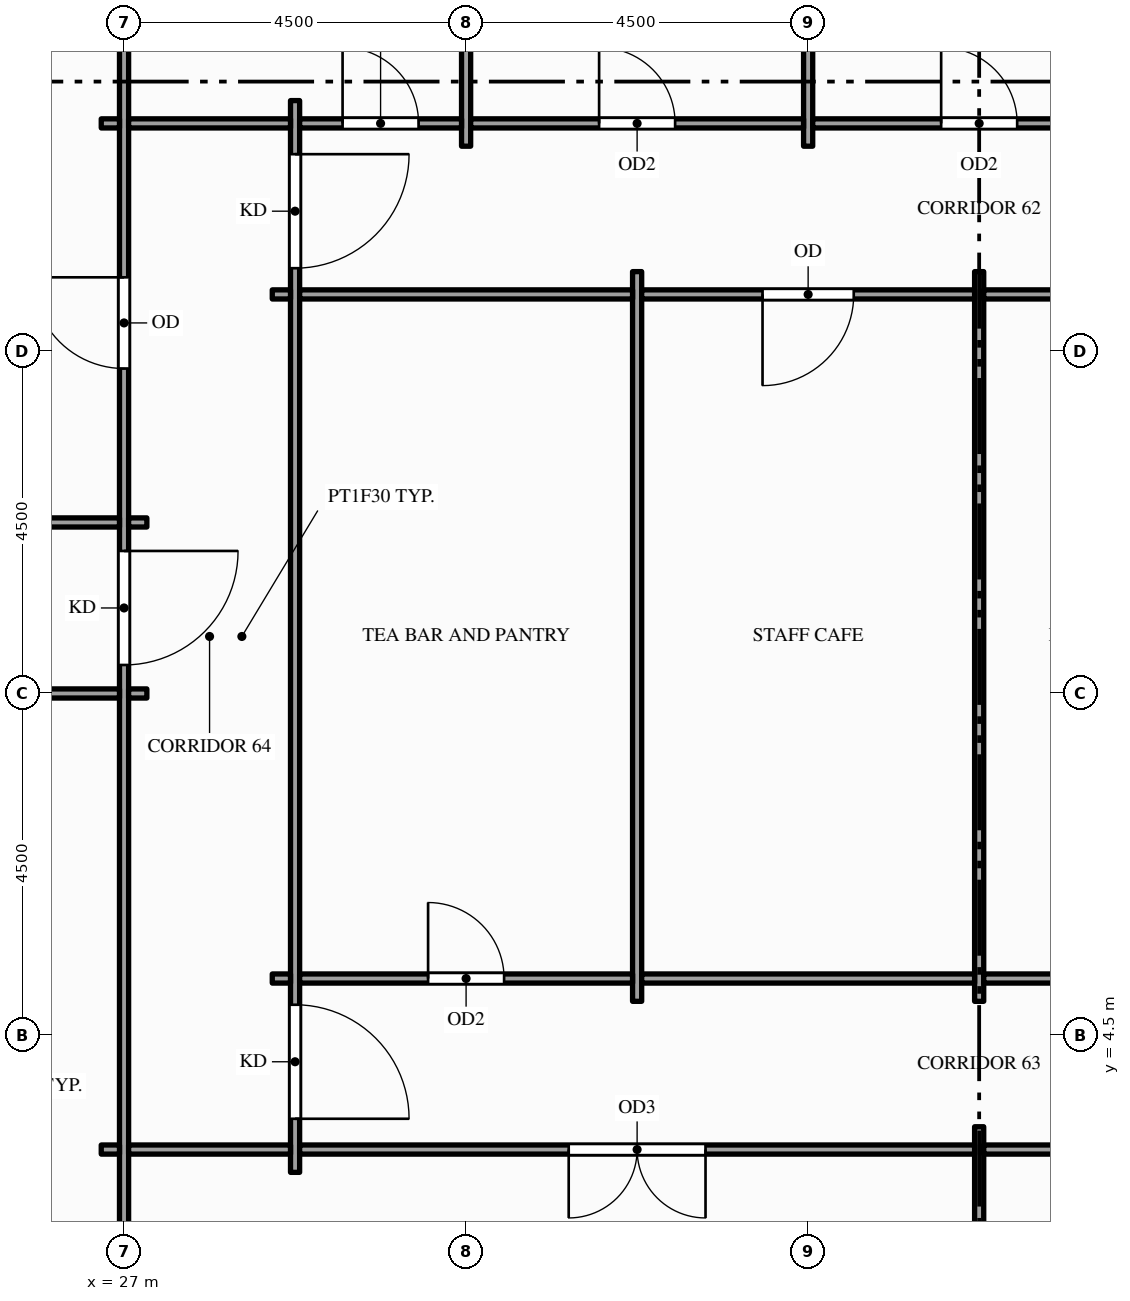
"""IFC4 building model, lengths in metres.
Left out: names, types, materials, properties, quantities, classifications, styles, units other than length and angle.
Written with IfcOpenShell. Run it as: python <this file> out.ifc"""

import sys

from ifc_helpers import new_model, si_unit, direction, frame, frame_2d, origin, place, context, subcontext, project, spatial, rectangle, extrude, element, fill, save


model = new_model("IFC4")
c1 = context("Model", 3, precision=1e-05, world=origin(), true_north=direction((0.0, 1.0)))
c2 = subcontext(c1, "Body", "Model", "MODEL_VIEW")
j1 = project(units=[si_unit("LENGTHUNIT", "METRE"), si_unit("PLANEANGLEUNIT", "RADIAN")], contexts=[c1])
p1 = place(None, origin())
s1 = spatial("IfcSite", under=j1, at=p1, CompositionType="ELEMENT")
p2 = place(p1, origin())
s2 = spatial("IfcBuilding", under=s1, at=p2, CompositionType="ELEMENT")
p3 = place(p2, frame((0.0, 0.0, 227.0)))
s3 = spatial("IfcBuildingStorey", under=s2, at=p3, CompositionType="ELEMENT", Elevation=227.0)
p4 = place(p3, frame((27.0, -1.35, 0.0), z_axis=(0.0, 0.0, 1.0), x_axis=(0.0, 1.0, 0.0)))
e1 = element("IfcWall", 1, at=p4, inside=s3, PredefinedType="PARTITIONING", context=c2, shape_type="SweptSolid", body=[
    extrude(rectangle(XDim=22.48, YDim=0.12, at=frame_2d((11.24, 0.0))), origin(), (0.0, 0.0, 1.0), 2.87),
])
p5 = place(p4, frame((10.725, 0.0, 0.0)))
e2 = element("IfcOpeningElement", 2, at=p5, cuts=e1, PredefinedType="OPENING", context=c2, shape_type="SweptSolid", body=[
    extrude(rectangle(XDim=1.5, YDim=2.1, at=frame_2d((0.75, 1.05))), frame((0.0, 0.07, 0.0), z_axis=(0.0, -1.0, 0.0), x_axis=(1.0, 0.0, 0.0)), (0.0, 0.0, 1.0), 0.14),
])
p6 = place(p4, frame((14.625, 0.0, 0.0)))
e3 = element("IfcOpeningElement", 3, at=p6, cuts=e1, PredefinedType="OPENING", context=c2, shape_type="SweptSolid", body=[
    extrude(rectangle(XDim=1.2, YDim=2.1, at=frame_2d((0.6, 1.05))), frame((0.0, 0.07, 0.0), z_axis=(0.0, -1.0, 0.0), x_axis=(1.0, 0.0, 0.0)), (0.0, 0.0, 1.0), 0.14),
])
p7 = place(p3, frame((29.25, 2.7, 0.0), z_axis=(0.0, 0.0, 1.0), x_axis=(0.0, 1.0, 0.0)))
e4 = element("IfcWall", 4, at=p7, inside=s3, PredefinedType="PARTITIONING", context=c2, shape_type="SweptSolid", body=[
    extrude(rectangle(XDim=14.1, YDim=0.12, at=frame_2d((7.05, 0.0))), origin(), (0.0, 0.0, 1.0), 2.87),
])
p8 = place(p7, frame((0.705, 0.0, 0.0)))
e5 = element("IfcOpeningElement", 5, at=p8, cuts=e4, PredefinedType="OPENING", context=c2, shape_type="SweptSolid", body=[
    extrude(rectangle(XDim=1.5, YDim=2.1, at=frame_2d((0.75, 1.05))), frame((0.0, 0.07, 0.0), z_axis=(0.0, -1.0, 0.0), x_axis=(1.0, 0.0, 0.0)), (0.0, 0.0, 1.0), 0.14),
])
p9 = place(p7, frame((11.895, 0.0, 0.0)))
e6 = element("IfcOpeningElement", 6, at=p9, cuts=e4, PredefinedType="OPENING", context=c2, shape_type="SweptSolid", body=[
    extrude(rectangle(XDim=1.5, YDim=2.1, at=frame_2d((0.75, 1.05))), frame((0.0, 0.07, 0.0), z_axis=(0.0, -1.0, 0.0), x_axis=(1.0, 0.0, 0.0)), (0.0, 0.0, 1.0), 0.14),
])
p10 = place(p3, frame((31.5, 16.2, 0.0), z_axis=(0.0, 0.0, 1.0), x_axis=(0.0, 1.0, 0.0)))
e7 = element("IfcWall", 7, at=p10, inside=s3, PredefinedType="PARTITIONING", context=c2, shape_type="SweptSolid", body=[
    extrude(rectangle(XDim=4.65, YDim=0.12, at=frame_2d((2.325, 0.0))), origin(), (0.0, 0.0, 1.0), 2.87),
])
p11 = place(p3, frame((33.75, 4.95, 0.0), z_axis=(0.0, 0.0, 1.0), x_axis=(0.0, 1.0, 0.0)))
e8 = element("IfcWall", 8, at=p11, inside=s3, PredefinedType="PARTITIONING", context=c2, shape_type="SweptSolid", body=[
    extrude(rectangle(XDim=9.6, YDim=0.12, at=frame_2d((4.8, 0.0))), origin(), (0.0, 0.0, 1.0), 2.87),
])
for number, where, z_axis, x_axis in (
    (9, (36.0, 16.2, 0.0), (0.0, 0.0, 1.0), (0.0, 1.0, 0.0)),
    (10, (38.25, -1.35, 0.0), (0.0, 0.0, 1.0), (0.0, 1.0, 0.0)),
):
    element("IfcWall", number, at=place(p3, frame(where, z_axis=z_axis, x_axis=x_axis)), inside=s3, PredefinedType="PARTITIONING", context=c2, shape_type="SweptSolid", body=[
        extrude(rectangle(XDim=4.65, YDim=0.12, at=frame_2d((2.325, 0.0))), origin(), (0.0, 0.0, 1.0), 2.87),
    ])
p12 = place(p3, frame((38.25, 4.95, 0.0), z_axis=(0.0, 0.0, 1.0), x_axis=(0.0, 1.0, 0.0)))
e11 = element("IfcWall", 11, at=p12, inside=s3, PredefinedType="PARTITIONING", context=c2, shape_type="SweptSolid", body=[
    extrude(rectangle(XDim=9.6, YDim=0.12, at=frame_2d((4.8, 0.0))), origin(), (0.0, 0.0, 1.0), 2.87),
])
p13 = place(p3, frame((26.7, 3.0, 0.0), z_axis=(0.0, 0.0, 1.0), x_axis=(1.0, 0.0, 0.0)))
e12 = element("IfcWall", 12, at=p13, inside=s3, PredefinedType="PARTITIONING", context=c2, shape_type="SweptSolid", body=[
    extrude(rectangle(XDim=0.24, YDim=0.12, at=frame_2d((0.12, 0.0))), origin(), (0.0, 0.0, 1.0), 2.87),
])
p14 = place(p3, frame((27.06, 3.0, 0.0), z_axis=(0.0, 0.0, 1.0), x_axis=(1.0, 0.0, 0.0)))
e13 = element("IfcWall", 13, at=p14, inside=s3, PredefinedType="PARTITIONING", context=c2, shape_type="SweptSolid", body=[
    extrude(rectangle(XDim=2.13, YDim=0.12, at=frame_2d((1.065, 0.0))), origin(), (0.0, 0.0, 1.0), 2.87),
])
p15 = place(p3, frame((29.31, 3.0, 0.0), z_axis=(0.0, 0.0, 1.0), x_axis=(1.0, 0.0, 0.0)))
e14 = element("IfcWall", 14, at=p15, inside=s3, PredefinedType="PARTITIONING", context=c2, shape_type="SweptSolid", body=[
    extrude(rectangle(XDim=8.88, YDim=0.12, at=frame_2d((4.44, 0.0))), origin(), (0.0, 0.0, 1.0), 2.87),
])
p16 = place(p15, frame((3.54, 0.0, 0.0)))
e15 = element("IfcOpeningElement", 15, at=p16, cuts=e14, PredefinedType="OPENING", context=c2, shape_type="SweptSolid", body=[
    extrude(rectangle(XDim=1.8, YDim=2.1, at=frame_2d((0.9, 1.05))), frame((0.0, 0.07, 0.0), z_axis=(0.0, -1.0, 0.0), x_axis=(1.0, 0.0, 0.0)), (0.0, 0.0, 1.0), 0.14),
])
p17 = place(p3, frame((38.31, 3.0, 0.0), z_axis=(0.0, 0.0, 1.0), x_axis=(1.0, 0.0, 0.0)))
e16 = element("IfcWall", 16, at=p17, inside=s3, PredefinedType="PARTITIONING", context=c2, shape_type="SweptSolid", body=[
    extrude(rectangle(XDim=4.38, YDim=0.12, at=frame_2d((2.19, 0.0))), origin(), (0.0, 0.0, 1.0), 2.87),
])
p18 = place(p17, frame((1.69, 0.0, 0.0)))
e17 = element("IfcOpeningElement", 17, at=p18, cuts=e16, PredefinedType="OPENING", context=c2, shape_type="SweptSolid", body=[
    extrude(rectangle(XDim=1.0, YDim=2.1, at=frame_2d((0.5, 1.05))), frame((0.0, 0.07, 0.0), z_axis=(0.0, -1.0, 0.0), x_axis=(1.0, 0.0, 0.0)), (0.0, 0.0, 1.0), 0.14),
])
p19 = place(p3, frame((28.95, 5.25, 0.0), z_axis=(0.0, 0.0, 1.0), x_axis=(1.0, 0.0, 0.0)))
e18 = element("IfcWall", 18, at=p19, inside=s3, PredefinedType="PARTITIONING", context=c2, shape_type="SweptSolid", body=[
    extrude(rectangle(XDim=0.24, YDim=0.12, at=frame_2d((0.12, 0.0))), origin(), (0.0, 0.0, 1.0), 2.87),
])
p20 = place(p3, frame((29.31, 5.25, 0.0), z_axis=(0.0, 0.0, 1.0), x_axis=(1.0, 0.0, 0.0)))
e19 = element("IfcWall", 19, at=p20, inside=s3, PredefinedType="PARTITIONING", context=c2, shape_type="SweptSolid", body=[
    extrude(rectangle(XDim=4.38, YDim=0.12, at=frame_2d((2.19, 0.0))), origin(), (0.0, 0.0, 1.0), 2.87),
])
p21 = place(p20, frame((1.69, 0.0, 0.0)))
e20 = element("IfcOpeningElement", 20, at=p21, cuts=e19, PredefinedType="OPENING", context=c2, shape_type="SweptSolid", body=[
    extrude(rectangle(XDim=1.0, YDim=2.1, at=frame_2d((0.5, 1.05))), frame((0.0, 0.07, 0.0), z_axis=(0.0, -1.0, 0.0), x_axis=(1.0, 0.0, 0.0)), (0.0, 0.0, 1.0), 0.14),
])
p22 = place(p3, frame((33.81, 5.25, 0.0), z_axis=(0.0, 0.0, 1.0), x_axis=(1.0, 0.0, 0.0)))
e21 = element("IfcWall", 21, at=p22, inside=s3, PredefinedType="PARTITIONING", context=c2, shape_type="SweptSolid", body=[
    extrude(rectangle(XDim=4.38, YDim=0.12, at=frame_2d((2.19, 0.0))), origin(), (0.0, 0.0, 1.0), 2.87),
])
p23 = place(p3, frame((38.31, 5.25, 0.0), z_axis=(0.0, 0.0, 1.0), x_axis=(1.0, 0.0, 0.0)))
e22 = element("IfcWall", 22, at=p23, inside=s3, PredefinedType="PARTITIONING", context=c2, shape_type="SweptSolid", body=[
    extrude(rectangle(XDim=4.38, YDim=0.12, at=frame_2d((2.19, 0.0))), origin(), (0.0, 0.0, 1.0), 2.87),
])
p24 = place(p23, frame((1.74, 0.0, 0.0)))
e23 = element("IfcOpeningElement", 23, at=p24, cuts=e22, PredefinedType="OPENING", context=c2, shape_type="SweptSolid", body=[
    extrude(rectangle(XDim=0.9, YDim=2.1, at=frame_2d((0.45, 1.05))), frame((0.0, 0.07, 0.0), z_axis=(0.0, -1.0, 0.0), x_axis=(1.0, 0.0, 0.0)), (0.0, 0.0, 1.0), 0.14),
])
p25 = place(p3, frame((18.06, 9.0, 0.0), z_axis=(0.0, 0.0, 1.0), x_axis=(1.0, 0.0, 0.0)))
e24 = element("IfcWall", 24, at=p25, inside=s3, PredefinedType="PARTITIONING", context=c2, shape_type="SweptSolid", body=[
    extrude(rectangle(XDim=8.88, YDim=0.12, at=frame_2d((4.44, 0.0))), origin(), (0.0, 0.0, 1.0), 2.76),
])
p26 = place(p25, frame((3.94, 0.0, 0.0)))
e25 = element("IfcOpeningElement", 25, at=p26, cuts=e24, PredefinedType="OPENING", context=c2, shape_type="SweptSolid", body=[
    extrude(rectangle(XDim=1.0, YDim=2.1, at=frame_2d((0.5, 1.05))), frame((0.0, 0.07, 0.0), z_axis=(0.0, -1.0, 0.0), x_axis=(1.0, 0.0, 0.0)), (0.0, 0.0, 1.0), 0.14),
])
p27 = place(p3, frame((27.06, 9.0, 0.0), z_axis=(0.0, 0.0, 1.0), x_axis=(1.0, 0.0, 0.0)))
e26 = element("IfcWall", 26, at=p27, inside=s3, PredefinedType="PARTITIONING", context=c2, shape_type="SweptSolid", body=[
    extrude(rectangle(XDim=0.24, YDim=0.12, at=frame_2d((0.12, 0.0))), origin(), (0.0, 0.0, 1.0), 2.87),
])
p28 = place(p3, frame((15.81, 11.25, 0.0), z_axis=(0.0, 0.0, 1.0), x_axis=(1.0, 0.0, 0.0)))
e27 = element("IfcWall", 27, at=p28, inside=s3, PredefinedType="PARTITIONING", context=c2, shape_type="SweptSolid", body=[
    extrude(rectangle(XDim=11.13, YDim=0.12, at=frame_2d((5.565, 0.0))), origin(), (0.0, 0.0, 1.0), 2.76),
])
p29 = place(p28, frame((3.54, 0.0, 0.0)))
e28 = element("IfcOpeningElement", 28, at=p29, cuts=e27, PredefinedType="OPENING", context=c2, shape_type="SweptSolid", body=[
    extrude(rectangle(XDim=1.8, YDim=2.1, at=frame_2d((0.9, 1.05))), frame((0.0, 0.07, 0.0), z_axis=(0.0, -1.0, 0.0), x_axis=(1.0, 0.0, 0.0)), (0.0, 0.0, 1.0), 0.14),
])
for number, where, z_axis, x_axis in (
    (29, (27.06, 11.25, 0.0), (0.0, 0.0, 1.0), (1.0, 0.0, 0.0)),
    (30, (28.95, 14.25, 0.0), (0.0, 0.0, 1.0), (1.0, 0.0, 0.0)),
):
    element("IfcWall", number, at=place(p3, frame(where, z_axis=z_axis, x_axis=x_axis)), inside=s3, PredefinedType="PARTITIONING", context=c2, shape_type="SweptSolid", body=[
        extrude(rectangle(XDim=0.24, YDim=0.12, at=frame_2d((0.12, 0.0))), origin(), (0.0, 0.0, 1.0), 2.87),
    ])
p30 = place(p3, frame((29.31, 14.25, 0.0), z_axis=(0.0, 0.0, 1.0), x_axis=(1.0, 0.0, 0.0)))
e31 = element("IfcWall", 31, at=p30, inside=s3, PredefinedType="PARTITIONING", context=c2, shape_type="SweptSolid", body=[
    extrude(rectangle(XDim=4.38, YDim=0.12, at=frame_2d((2.19, 0.0))), origin(), (0.0, 0.0, 1.0), 2.87),
])
p31 = place(p3, frame((33.81, 14.25, 0.0), z_axis=(0.0, 0.0, 1.0), x_axis=(1.0, 0.0, 0.0)))
e32 = element("IfcWall", 32, at=p31, inside=s3, PredefinedType="PARTITIONING", context=c2, shape_type="SweptSolid", body=[
    extrude(rectangle(XDim=4.38, YDim=0.12, at=frame_2d((2.19, 0.0))), origin(), (0.0, 0.0, 1.0), 2.87),
])
p32 = place(p31, frame((1.59, 0.0, 0.0)))
e33 = element("IfcOpeningElement", 33, at=p32, cuts=e32, PredefinedType="OPENING", context=c2, shape_type="SweptSolid", body=[
    extrude(rectangle(XDim=1.2, YDim=2.1, at=frame_2d((0.6, 1.05))), frame((0.0, 0.07, 0.0), z_axis=(0.0, -1.0, 0.0), x_axis=(1.0, 0.0, 0.0)), (0.0, 0.0, 1.0), 0.14),
])
p33 = place(p3, frame((38.31, 14.25, 0.0), z_axis=(0.0, 0.0, 1.0), x_axis=(1.0, 0.0, 0.0)))
e34 = element("IfcWall", 34, at=p33, inside=s3, PredefinedType="PARTITIONING", context=c2, shape_type="SweptSolid", body=[
    extrude(rectangle(XDim=4.38, YDim=0.12, at=frame_2d((2.19, 0.0))), origin(), (0.0, 0.0, 1.0), 2.87),
])
p34 = place(p3, frame((26.7, 16.5, 0.0), z_axis=(0.0, 0.0, 1.0), x_axis=(1.0, 0.0, 0.0)))
e35 = element("IfcWall", 35, at=p34, inside=s3, PredefinedType="PARTITIONING", context=c2, shape_type="SweptSolid", body=[
    extrude(rectangle(XDim=0.24, YDim=0.12, at=frame_2d((0.12, 0.0))), origin(), (0.0, 0.0, 1.0), 2.87),
])
p35 = place(p3, frame((27.06, 16.5, 0.0), z_axis=(0.0, 0.0, 1.0), x_axis=(1.0, 0.0, 0.0)))
e36 = element("IfcWall", 36, at=p35, inside=s3, PredefinedType="PARTITIONING", context=c2, shape_type="SweptSolid", body=[
    extrude(rectangle(XDim=2.13, YDim=0.12, at=frame_2d((1.065, 0.0))), origin(), (0.0, 0.0, 1.0), 2.87),
])
p36 = place(p3, frame((29.31, 16.5, 0.0), z_axis=(0.0, 0.0, 1.0), x_axis=(1.0, 0.0, 0.0)))
e37 = element("IfcWall", 37, at=p36, inside=s3, PredefinedType="PARTITIONING", context=c2, shape_type="SweptSolid", body=[
    extrude(rectangle(XDim=2.13, YDim=0.12, at=frame_2d((1.065, 0.0))), origin(), (0.0, 0.0, 1.0), 2.87),
])
p37 = place(p36, frame((0.565, 0.0, 0.0)))
e38 = element("IfcOpeningElement", 38, at=p37, cuts=e37, PredefinedType="OPENING", context=c2, shape_type="SweptSolid", body=[
    extrude(rectangle(XDim=1.0, YDim=2.1, at=frame_2d((0.5, 1.05))), frame((0.0, 0.07, 0.0), z_axis=(0.0, -1.0, 0.0), x_axis=(1.0, 0.0, 0.0)), (0.0, 0.0, 1.0), 0.14),
])
p38 = place(p3, frame((31.56, 16.5, 0.0), z_axis=(0.0, 0.0, 1.0), x_axis=(1.0, 0.0, 0.0)))
e39 = element("IfcWall", 39, at=p38, inside=s3, PredefinedType="PARTITIONING", context=c2, shape_type="SweptSolid", body=[
    extrude(rectangle(XDim=4.38, YDim=0.12, at=frame_2d((2.19, 0.0))), origin(), (0.0, 0.0, 1.0), 2.87),
])
p39 = place(p38, frame((1.69, 0.0, 0.0)))
e40 = element("IfcOpeningElement", 40, at=p39, cuts=e39, PredefinedType="OPENING", context=c2, shape_type="SweptSolid", body=[
    extrude(rectangle(XDim=1.0, YDim=2.1, at=frame_2d((0.5, 1.05))), frame((0.0, 0.07, 0.0), z_axis=(0.0, -1.0, 0.0), x_axis=(1.0, 0.0, 0.0)), (0.0, 0.0, 1.0), 0.14),
])
p40 = place(p3, frame((36.06, 16.5, 0.0), z_axis=(0.0, 0.0, 1.0), x_axis=(1.0, 0.0, 0.0)))
e41 = element("IfcWall", 41, at=p40, inside=s3, PredefinedType="PARTITIONING", context=c2, shape_type="SweptSolid", body=[
    extrude(rectangle(XDim=4.38, YDim=0.12, at=frame_2d((2.19, 0.0))), origin(), (0.0, 0.0, 1.0), 2.87),
])
p41 = place(p40, frame((1.69, 0.0, 0.0)))
e42 = element("IfcOpeningElement", 42, at=p41, cuts=e41, PredefinedType="OPENING", context=c2, shape_type="SweptSolid", body=[
    extrude(rectangle(XDim=1.0, YDim=2.1, at=frame_2d((0.5, 1.05))), frame((0.0, 0.07, 0.0), z_axis=(0.0, -1.0, 0.0), x_axis=(1.0, 0.0, 0.0)), (0.0, 0.0, 1.0), 0.14),
])
p42 = place(p5, origin())
e43 = element("IfcDoor", 43, at=p42, inside=s3, OperationType="SINGLE_SWING_RIGHT", PredefinedType="DOOR", context=c2, shape_type="SweptSolid", body=[
    extrude(rectangle(XDim=1.5, YDim=2.1, at=frame_2d((0.75, 1.05))), frame((0.0, 0.025, 0.0), z_axis=(0.0, -1.0, 0.0), x_axis=(1.0, 0.0, 0.0)), (0.0, 0.0, 1.0), 0.05),
])
fill(e2, e43)
p43 = place(p8, origin())
e44 = element("IfcDoor", 44, at=p43, inside=s3, OperationType="SINGLE_SWING_LEFT", PredefinedType="DOOR", context=c2, shape_type="SweptSolid", body=[
    extrude(rectangle(XDim=1.5, YDim=2.1, at=frame_2d((0.75, 1.05))), frame((0.0, 0.025, 0.0), z_axis=(0.0, -1.0, 0.0), x_axis=(1.0, 0.0, 0.0)), (0.0, 0.0, 1.0), 0.05),
])
fill(e5, e44)
p44 = place(p9, origin())
e45 = element("IfcDoor", 45, at=p44, inside=s3, OperationType="SINGLE_SWING_RIGHT", PredefinedType="DOOR", context=c2, shape_type="SweptSolid", body=[
    extrude(rectangle(XDim=1.5, YDim=2.1, at=frame_2d((0.75, 1.05))), frame((0.0, 0.025, 0.0), z_axis=(0.0, -1.0, 0.0), x_axis=(1.0, 0.0, 0.0)), (0.0, 0.0, 1.0), 0.05),
])
fill(e6, e45)
p45 = place(p21, origin())
e46 = element("IfcDoor", 46, at=p45, inside=s3, OperationType="SINGLE_SWING_LEFT", PredefinedType="DOOR", context=c2, shape_type="SweptSolid", body=[
    extrude(rectangle(XDim=1.0, YDim=2.1, at=frame_2d((0.5, 1.05))), frame((0.0, 0.025, 0.0), z_axis=(0.0, -1.0, 0.0), x_axis=(1.0, 0.0, 0.0)), (0.0, 0.0, 1.0), 0.05),
])
fill(e20, e46)
p46 = place(p32, origin())
e47 = element("IfcDoor", 47, at=p46, inside=s3, OperationType="SINGLE_SWING_LEFT", PredefinedType="DOOR", context=c2, shape_type="SweptSolid", body=[
    extrude(rectangle(XDim=1.2, YDim=2.1, at=frame_2d((0.6, 1.05))), frame((0.0, 0.025, 0.0), z_axis=(0.0, -1.0, 0.0), x_axis=(1.0, 0.0, 0.0)), (0.0, 0.0, 1.0), 0.05),
])
fill(e33, e47)
p47 = place(p16, origin())
e48 = element("IfcDoor", 48, at=p47, inside=s3, OperationType="DOUBLE_DOOR_SINGLE_SWING", PredefinedType="DOOR", context=c2, shape_type="SweptSolid", body=[
    extrude(rectangle(XDim=1.8, YDim=2.1, at=frame_2d((0.9, 1.05))), frame((0.0, 0.025, 0.0), z_axis=(0.0, -1.0, 0.0), x_axis=(1.0, 0.0, 0.0)), (0.0, 0.0, 1.0), 0.05),
])
fill(e15, e48)
p48 = place(p37, origin())
e49 = element("IfcDoor", 49, at=p48, inside=s3, OperationType="SINGLE_SWING_LEFT", PredefinedType="DOOR", context=c2, shape_type="SweptSolid", body=[
    extrude(rectangle(XDim=1.0, YDim=2.1, at=frame_2d((0.5, 1.05))), frame((0.0, 0.025, 0.0), z_axis=(0.0, -1.0, 0.0), x_axis=(1.0, 0.0, 0.0)), (0.0, 0.0, 1.0), 0.05),
])
fill(e38, e49)
p49 = place(p39, origin())
e50 = element("IfcDoor", 50, at=p49, inside=s3, OperationType="SINGLE_SWING_LEFT", PredefinedType="DOOR", context=c2, shape_type="SweptSolid", body=[
    extrude(rectangle(XDim=1.0, YDim=2.1, at=frame_2d((0.5, 1.05))), frame((0.0, 0.025, 0.0), z_axis=(0.0, -1.0, 0.0), x_axis=(1.0, 0.0, 0.0)), (0.0, 0.0, 1.0), 0.05),
])
fill(e40, e50)
p50 = place(p41, origin())
e51 = element("IfcDoor", 51, at=p50, inside=s3, OperationType="SINGLE_SWING_LEFT", PredefinedType="DOOR", context=c2, shape_type="SweptSolid", body=[
    extrude(rectangle(XDim=1.0, YDim=2.1, at=frame_2d((0.5, 1.05))), frame((0.0, 0.025, 0.0), z_axis=(0.0, -1.0, 0.0), x_axis=(1.0, 0.0, 0.0)), (0.0, 0.0, 1.0), 0.05),
])
fill(e42, e51)
p51 = place(p6, origin())
e52 = element("IfcDoor", 52, at=p51, inside=s3, OperationType="SINGLE_SWING_RIGHT", PredefinedType="DOOR", context=c2, shape_type="SweptSolid", body=[
    extrude(rectangle(XDim=1.2, YDim=2.1, at=frame_2d((0.6, 1.05))), frame((0.0, 0.025, 0.0), z_axis=(0.0, -1.0, 0.0), x_axis=(1.0, 0.0, 0.0)), (0.0, 0.0, 1.0), 0.05),
])
fill(e3, e52)
save(model, sys.argv[1])
